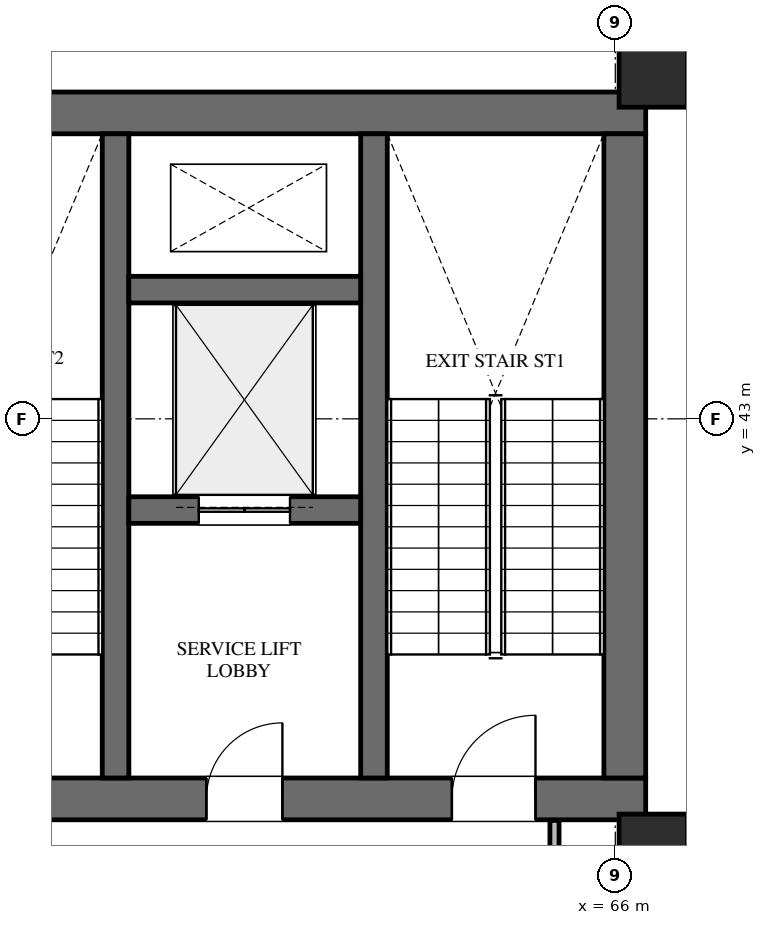
"""IFC4 building model, lengths in metres.
Left out: names, types, materials, properties, quantities, classifications, styles, units other than length and angle.
Written with IfcOpenShell. Run it as: python <this file> out.ifc"""

import sys

from ifc_helpers import new_model, si_unit, direction, frame, frame_2d, origin, origin_2d, place, context, subcontext, project, spatial, rectangle, extrude, element, fill, save


model = new_model("IFC4")
c1 = context("Model", 3, precision=1e-05, world=origin(), true_north=direction((0.0, 1.0)))
c2 = subcontext(c1, "Body", "Model", "MODEL_VIEW")
j1 = project(units=[si_unit("LENGTHUNIT", "METRE"), si_unit("PLANEANGLEUNIT", "RADIAN")], contexts=[c1])
p1 = place(None, origin())
s1 = spatial("IfcSite", under=j1, at=p1, CompositionType="ELEMENT")
p2 = place(p1, origin())
s2 = spatial("IfcBuilding", under=s1, at=p2, CompositionType="ELEMENT")
p3 = place(p2, frame((0.0, 0.0, 220.5)))
s3 = spatial("IfcBuildingStorey", under=s2, at=p3, CompositionType="ELEMENT", Elevation=220.5)
p4 = place(p3, frame((22.9, 47.025, 0.0), z_axis=(0.0, 0.0, 1.0), x_axis=(1.0, 0.0, 0.0)))
e1 = element("IfcWall", 1, at=p4, inside=s3, PredefinedType="SHEAR", context=c2, shape_type="SweptSolid", body=[
    extrude(rectangle(XDim=43.5, YDim=0.55, at=frame_2d((21.75, 0.0))), origin(), (0.0, 0.0, 1.0), 4.5),
])
p5 = place(p3, frame((55.8, 38.0, 0.0), z_axis=(0.0, 0.0, 1.0), x_axis=(1.0, 0.0, 0.0)))
e2 = element("IfcWall", 2, at=p5, inside=s3, PredefinedType="SHEAR", context=c2, shape_type="SweptSolid", body=[
    extrude(rectangle(XDim=10.6, YDim=0.55, at=frame_2d((5.3, 0.0))), origin(), (0.0, 0.0, 1.0), 4.5),
])
p6 = place(p5, frame((1.5, 0.0, 0.0)))
e3 = element("IfcOpeningElement", 3, at=p6, cuts=e2, PredefinedType="OPENING", context=c2, shape_type="SweptSolid", body=[
    extrude(rectangle(XDim=1.1, YDim=2.2, at=frame_2d((0.55, 1.1))), frame((0.0, 0.285, 0.0), z_axis=(0.0, -1.0, 0.0), x_axis=(1.0, 0.0, 0.0)), (0.0, 0.0, 1.0), 0.57),
])
p7 = place(p5, frame((4.82, 0.0, 0.0)))
e4 = element("IfcOpeningElement", 4, at=p7, cuts=e2, PredefinedType="OPENING", context=c2, shape_type="SweptSolid", body=[
    extrude(rectangle(XDim=1.0, YDim=2.15, at=frame_2d((0.5, 1.075))), frame((0.0, 0.285, 0.0), z_axis=(0.0, -1.0, 0.0), x_axis=(1.0, 0.0, 0.0)), (0.0, 0.0, 1.0), 0.57),
])
p8 = place(p5, frame((8.05, 0.0, 0.0)))
e5 = element("IfcOpeningElement", 5, at=p8, cuts=e2, PredefinedType="OPENING", context=c2, shape_type="SweptSolid", body=[
    extrude(rectangle(XDim=1.1, YDim=2.2, at=frame_2d((0.55, 1.1))), frame((0.0, 0.285, 0.0), z_axis=(0.0, -1.0, 0.0), x_axis=(1.0, 0.0, 0.0)), (0.0, 0.0, 1.0), 0.57),
])
p9 = place(p3, frame((66.125, 38.275, 0.0), z_axis=(0.0, 0.0, 1.0), x_axis=(0.0, 1.0, 0.0)))
e6 = element("IfcWall", 6, at=p9, inside=s3, PredefinedType="SHEAR", context=c2, shape_type="SweptSolid", body=[
    extrude(rectangle(XDim=8.475, YDim=0.55, at=frame_2d((4.238, 0.0))), origin(), (0.0, 0.0, 1.0), 4.5),
])
for number, where, z_axis, x_axis in (
    (7, (62.825, 38.275, 0.0), (0.0, 0.0, 1.0), (0.0, 1.0, 0.0)),
    (8, (59.425, 38.275, 0.0), (0.0, 0.0, 1.0), (0.0, 1.0, 0.0)),
):
    element("IfcWall", number, at=place(p3, frame(where, z_axis=z_axis, x_axis=x_axis)), inside=s3, PredefinedType="SHEAR", context=c2, shape_type="SweptSolid", body=[
        extrude(rectangle(XDim=8.475, YDim=0.35, at=frame_2d((4.238, 0.0))), origin(), (0.0, 0.0, 1.0), 4.5),
    ])
p10 = place(p3, frame((59.6, 41.8, 0.0), z_axis=(0.0, 0.0, 1.0), x_axis=(1.0, 0.0, 0.0)))
e9 = element("IfcWall", 9, at=p10, inside=s3, PredefinedType="SHEAR", context=c2, shape_type="SweptSolid", body=[
    extrude(rectangle(XDim=3.05, YDim=0.35, at=frame_2d((1.525, 0.0))), origin(), (0.0, 0.0, 1.0), 4.5),
])
p11 = place(p10, frame((0.92, 0.0, 0.0)))
e10 = element("IfcOpeningElement", 10, at=p11, cuts=e9, PredefinedType="OPENING", context=c2, shape_type="SweptSolid", body=[
    extrude(rectangle(XDim=1.2, YDim=2.2, at=frame_2d((0.6, 1.1))), frame((0.0, 0.185, 0.0), z_axis=(0.0, -1.0, 0.0), x_axis=(1.0, 0.0, 0.0)), (0.0, 0.0, 1.0), 0.37),
])
p12 = place(p3, frame((59.6, 44.7, 0.0), z_axis=(0.0, 0.0, 1.0), x_axis=(1.0, 0.0, 0.0)))
e11 = element("IfcWall", 11, at=p12, inside=s3, PredefinedType="SHEAR", context=c2, shape_type="SweptSolid", body=[
    extrude(rectangle(XDim=3.05, YDim=0.35, at=frame_2d((1.525, 0.0))), origin(), (0.0, 0.0, 1.0), 4.5),
])
for number, where, z_axis, x_axis in (
    (12, (66.5, 47.55, 0.0), (0.0, 0.0, 1.0), (1.0, 0.0, 0.0)),
    (13, (66.5, 37.35, 0.0), (0.0, 0.0, 1.0), (1.0, 0.0, 0.0)),
):
    element("IfcColumn", number, at=place(p3, frame(where, z_axis=z_axis, x_axis=x_axis)), inside=s3, PredefinedType="COLUMN", context=c2, shape_type="SweptSolid", body=[
        extrude(rectangle(XDim=0.9, YDim=0.9, at=origin_2d()), origin(), (0.0, 0.0, 1.0), 4.5),
    ])
p13 = place(p3, frame((65.2, 34.4, 0.0), z_axis=(0.0, 0.0, 1.0), x_axis=(0.0, 1.0, 0.0)))
e14 = element("IfcWall", 14, at=p13, inside=s3, PredefinedType="PARTITIONING", context=c2, shape_type="SweptSolid", body=[
    extrude(rectangle(XDim=3.317, YDim=0.12, at=frame_2d((1.659, 0.0))), origin(), (0.0, 0.0, 1.0), 3.447),
])
p14 = place(p7, origin())
e15 = element("IfcDoor", 15, at=p14, inside=s3, OperationType="SINGLE_SWING_RIGHT", PredefinedType="DOOR", context=c2, shape_type="SweptSolid", body=[
    extrude(rectangle(XDim=1.0, YDim=2.15, at=frame_2d((0.5, 1.075))), frame((0.0, 0.025, 0.0), z_axis=(0.0, -1.0, 0.0), x_axis=(1.0, 0.0, 0.0)), (0.0, 0.0, 1.0), 0.05),
])
fill(e4, e15)
p15 = place(p8, origin())
e16 = element("IfcDoor", 16, at=p15, inside=s3, OperationType="SINGLE_SWING_RIGHT", PredefinedType="DOOR", context=c2, shape_type="SweptSolid", body=[
    extrude(rectangle(XDim=1.1, YDim=2.2, at=frame_2d((0.55, 1.1))), frame((0.0, 0.025, 0.0), z_axis=(0.0, -1.0, 0.0), x_axis=(1.0, 0.0, 0.0)), (0.0, 0.0, 1.0), 0.05),
])
fill(e5, e16)
p16 = place(p11, origin())
e17 = element("IfcDoor", 17, at=p16, inside=s3, OperationType="DOUBLE_DOOR_SLIDING", PredefinedType="DOOR", context=c2, shape_type="SweptSolid", body=[
    extrude(rectangle(XDim=1.2, YDim=2.2, at=frame_2d((0.6, 1.1))), frame((0.0, 0.025, 0.0), z_axis=(0.0, -1.0, 0.0), x_axis=(1.0, 0.0, 0.0)), (0.0, 0.0, 1.0), 0.05),
])
fill(e10, e17)
save(model, sys.argv[1])
